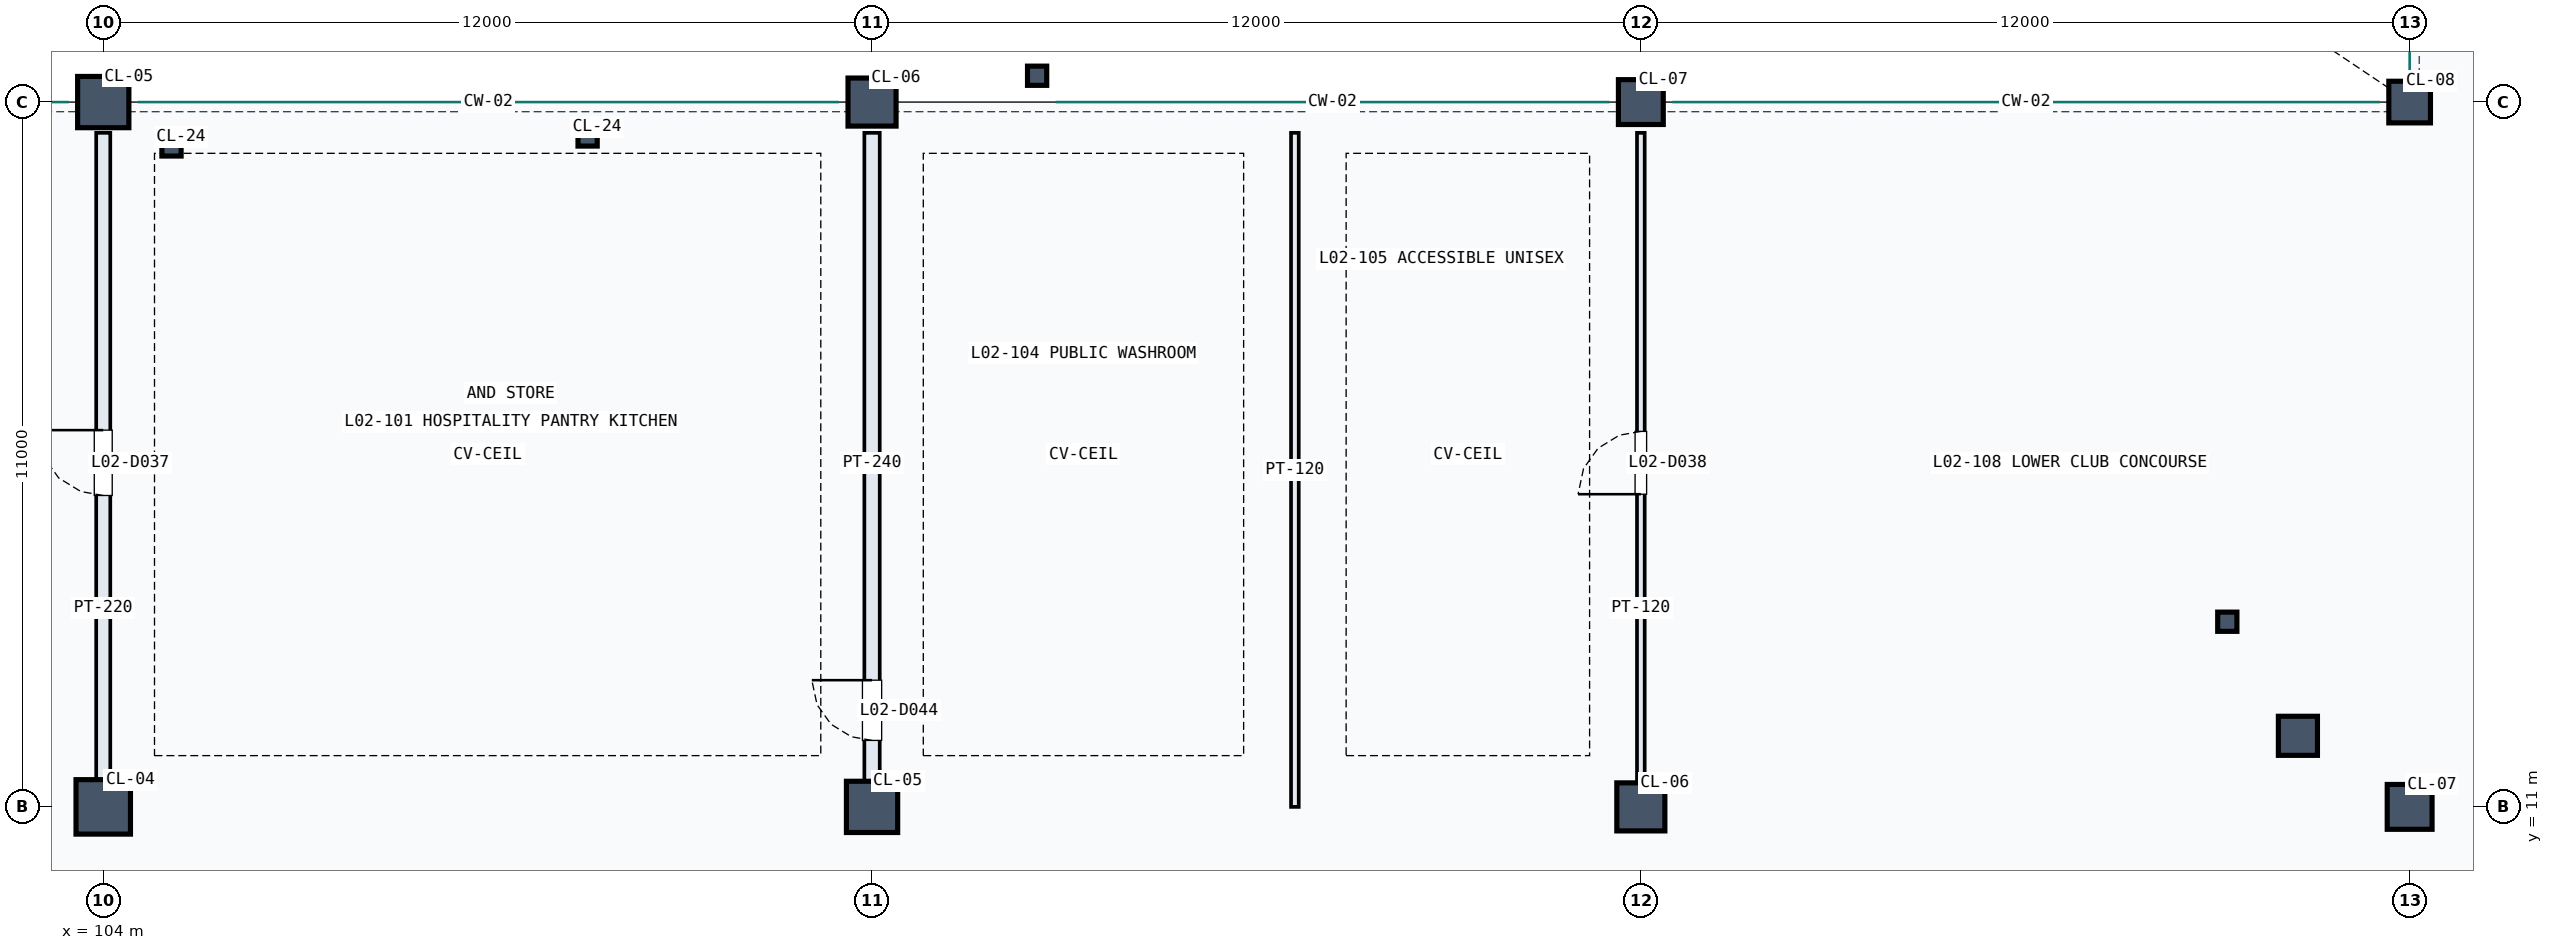
"""IFC4 building model, lengths in metres.
Left out: names, types, materials, properties, quantities, classifications, styles, units other than length and angle.
Written with IfcOpenShell. Run it as: python <this file> out.ifc"""

import sys

from ifc_helpers import new_model, si_unit, direction, frame, frame_2d, origin, origin_2d, place, context, subcontext, project, spatial, rectangle, hollow_rectangle, hollow_circle, extrude, element, fill, save


model = new_model("IFC4")
c1 = context("Model", 3, precision=1e-05, world=origin(), true_north=direction((0.0, 1.0)))
c2 = subcontext(c1, "Body", "Model", "MODEL_VIEW")
j1 = project(units=[si_unit("LENGTHUNIT", "METRE"), si_unit("PLANEANGLEUNIT", "RADIAN")], contexts=[c1])
p1 = place(None, origin())
s1 = spatial("IfcSite", under=j1, at=p1, CompositionType="ELEMENT")
p2 = place(p1, origin())
s2 = spatial("IfcBuilding", under=s1, at=p2, CompositionType="ELEMENT")
p3 = place(p2, frame((0.0, 0.0, 10.2)))
s3 = spatial("IfcBuildingStorey", under=s2, at=p3, CompositionType="ELEMENT", Elevation=10.2)
p4 = place(p3, frame((104.0, 11.0, 0.0), z_axis=(0.0, 0.0, 1.0), x_axis=(1.0, 0.0, 0.0)))
e1 = element("IfcColumn", 1, at=p4, inside=s3, PredefinedType="COLUMN", context=c2, shape_type="SweptSolid", body=[
    extrude(rectangle(XDim=0.85, YDim=0.85, at=origin_2d()), origin(), (0.0, 0.0, 1.0), 4.5),
])
for number, where, z_axis, x_axis in (
    (2, (104.0, 22.0, 0.0), (0.0, 0.0, 1.0), (1.0, 0.0, 0.0)),
    (3, (116.0, 11.0, 0.0), (0.0, 0.0, 1.0), (1.0, 0.0, 0.0)),
):
    element("IfcColumn", number, at=place(p3, frame(where, z_axis=z_axis, x_axis=x_axis)), inside=s3, PredefinedType="COLUMN", context=c2, shape_type="SweptSolid", body=[
        extrude(rectangle(XDim=0.8, YDim=0.8, at=origin_2d()), origin(), (0.0, 0.0, 1.0), 4.5),
    ])
for number, where, z_axis, x_axis in (
    (4, (116.0, 22.0, 0.0), (0.0, 0.0, 1.0), (1.0, 0.0, 0.0)),
    (5, (128.0, 11.0, 0.0), (0.0, 0.0, 1.0), (1.0, 0.0, 0.0)),
):
    element("IfcColumn", number, at=place(p3, frame(where, z_axis=z_axis, x_axis=x_axis)), inside=s3, PredefinedType="COLUMN", context=c2, shape_type="SweptSolid", body=[
        extrude(rectangle(XDim=0.75, YDim=0.75, at=origin_2d()), origin(), (0.0, 0.0, 1.0), 4.5),
    ])
for number, where, z_axis, x_axis in (
    (6, (128.0, 22.0, 0.0), (0.0, 0.0, 1.0), (1.0, 0.0, 0.0)),
    (7, (140.0, 11.0, 0.0), (0.0, 0.0, 1.0), (1.0, 0.0, 0.0)),
):
    element("IfcColumn", number, at=place(p3, frame(where, z_axis=z_axis, x_axis=x_axis)), inside=s3, PredefinedType="COLUMN", context=c2, shape_type="SweptSolid", body=[
        extrude(rectangle(XDim=0.7, YDim=0.7, at=origin_2d()), origin(), (0.0, 0.0, 1.0), 4.5),
    ])
p5 = place(p3, frame((140.0, 22.0, 0.0), z_axis=(0.0, 0.0, 1.0), x_axis=(1.0, 0.0, 0.0)))
e8 = element("IfcColumn", 8, at=p5, inside=s3, PredefinedType="COLUMN", context=c2, shape_type="SweptSolid", body=[
    extrude(rectangle(XDim=0.65, YDim=0.65, at=origin_2d()), origin(), (0.0, 0.0, 1.0), 4.5),
])
p6 = place(p3, frame((138.256, 12.109, 0.0), z_axis=(0.0, 0.0, 1.0), x_axis=(1.0, 0.0, 0.0)))
e9 = element("IfcColumn", 9, at=p6, inside=s3, PredefinedType="COLUMN", context=c2, shape_type="SweptSolid", body=[
    extrude(hollow_circle(Radius=0.305, WallThickness=0.025, at=origin_2d()), origin(), (0.0, 0.0, 1.0), 4.5),
])
for number, where, z_axis, x_axis in (
    (10, (105.065, 21.308, 0.0), (0.0, 0.0, 1.0), (1.0, 0.0, 0.0)),
    (11, (111.56, 21.463, 0.0), (0.0, 0.0, 1.0), (1.0, 0.0, 0.0)),
    (12, (118.577, 22.411, 0.0), (0.0, 0.0, 1.0), (1.0, 0.0, 0.0)),
    (13, (137.154, 13.89, 0.0), (0.0, 0.0, 1.0), (1.0, 0.0, 0.0)),
):
    element("IfcColumn", number, at=place(p3, frame(where, z_axis=z_axis, x_axis=x_axis)), inside=s3, PredefinedType="COLUMN", context=c2, shape_type="SweptSolid", body=[
        extrude(hollow_rectangle(XDim=0.3, YDim=0.3, WallThickness=0.016, at=origin_2d()), origin(), (0.0, 0.0, 1.0), 4.5),
    ])
p7 = place(p3, frame((104.0, 11.22, 0.0), z_axis=(0.0, 0.0, 1.0), x_axis=(0.0, 1.0, 0.0)))
e14 = element("IfcWall", 14, at=p7, inside=s3, PredefinedType="PARTITIONING", context=c2, shape_type="SweptSolid", body=[
    extrude(rectangle(XDim=10.3, YDim=0.22, at=frame_2d((5.15, 0.0))), origin(), (0.0, 0.0, 1.0), 3.47),
])
p8 = place(p7, frame((4.64, 0.0, 0.0)))
e15 = element("IfcOpeningElement", 15, at=p8, cuts=e14, PredefinedType="OPENING", context=c2, shape_type="SweptSolid", body=[
    extrude(rectangle(XDim=1.02, YDim=2.25, at=frame_2d((0.51, 1.125))), frame((0.0, 0.12, 0.0), z_axis=(0.0, -1.0, 0.0), x_axis=(1.0, 0.0, 0.0)), (0.0, 0.0, 1.0), 0.24),
])
p9 = place(p3, frame((128.0, 11.22, 0.0), z_axis=(0.0, 0.0, 1.0), x_axis=(0.0, 1.0, 0.0)))
e16 = element("IfcWall", 16, at=p9, inside=s3, PredefinedType="PARTITIONING", context=c2, shape_type="SweptSolid", body=[
    extrude(rectangle(XDim=10.3, YDim=0.12, at=frame_2d((5.15, 0.0))), origin(), (0.0, 0.0, 1.0), 3.14),
])
p10 = place(p9, frame((4.66, 0.0, 0.0)))
e17 = element("IfcOpeningElement", 17, at=p10, cuts=e16, PredefinedType="OPENING", context=c2, shape_type="SweptSolid", body=[
    extrude(rectangle(XDim=0.98, YDim=2.1, at=frame_2d((0.49, 1.05))), frame((0.0, 0.07, 0.0), z_axis=(0.0, -1.0, 0.0), x_axis=(1.0, 0.0, 0.0)), (0.0, 0.0, 1.0), 0.14),
])
p11 = place(p3, frame((116.0, 11.22, 0.0), z_axis=(0.0, 0.0, 1.0), x_axis=(0.0, 1.0, 0.0)))
e18 = element("IfcWall", 18, at=p11, inside=s3, PredefinedType="PARTITIONING", context=c2, shape_type="SweptSolid", body=[
    extrude(rectangle(XDim=10.3, YDim=0.24, at=frame_2d((5.15, 0.0))), origin(), (0.0, 0.0, 1.0), 3.49),
])
p12 = place(p11, frame((0.817, 0.0, 0.0)))
e19 = element("IfcOpeningElement", 19, at=p12, cuts=e18, PredefinedType="OPENING", context=c2, shape_type="SweptSolid", body=[
    extrude(rectangle(XDim=0.94, YDim=2.15, at=frame_2d((0.47, 1.075))), frame((0.0, 0.13, 0.0), z_axis=(0.0, -1.0, 0.0), x_axis=(1.0, 0.0, 0.0)), (0.0, 0.0, 1.0), 0.26),
])
p13 = place(p3, frame((122.6, 11.0, 0.0), z_axis=(0.0, 0.0, 1.0), x_axis=(0.0, 1.0, 0.0)))
e20 = element("IfcWall", 20, at=p13, inside=s3, PredefinedType="PARTITIONING", context=c2, shape_type="SweptSolid", body=[
    extrude(rectangle(XDim=10.52, YDim=0.12, at=frame_2d((5.26, 0.0))), origin(), (0.0, 0.0, 1.0), 3.49),
])
p14 = place(p8, origin())
e21 = element("IfcDoor", 21, at=p14, inside=s3, OperationType="SINGLE_SWING_RIGHT", PredefinedType="DOOR", context=c2, shape_type="SweptSolid", body=[
    extrude(rectangle(XDim=1.02, YDim=2.25, at=frame_2d((0.51, 1.125))), frame((0.0, 0.025, 0.0), z_axis=(0.0, -1.0, 0.0), x_axis=(1.0, 0.0, 0.0)), (0.0, 0.0, 1.0), 0.05),
])
fill(e15, e21)
p15 = place(p10, origin())
e22 = element("IfcDoor", 22, at=p15, inside=s3, OperationType="SINGLE_SWING_LEFT", PredefinedType="DOOR", context=c2, shape_type="SweptSolid", body=[
    extrude(rectangle(XDim=0.98, YDim=2.1, at=frame_2d((0.49, 1.05))), frame((0.0, 0.025, 0.0), z_axis=(0.0, -1.0, 0.0), x_axis=(1.0, 0.0, 0.0)), (0.0, 0.0, 1.0), 0.05),
])
fill(e17, e22)
p16 = place(p12, origin())
e23 = element("IfcDoor", 23, at=p16, inside=s3, OperationType="SINGLE_SWING_RIGHT", PredefinedType="DOOR", context=c2, shape_type="SweptSolid", body=[
    extrude(rectangle(XDim=0.94, YDim=2.15, at=frame_2d((0.47, 1.075))), frame((0.0, 0.025, 0.0), z_axis=(0.0, -1.0, 0.0), x_axis=(1.0, 0.0, 0.0)), (0.0, 0.0, 1.0), 0.05),
])
fill(e19, e23)
save(model, sys.argv[1])
